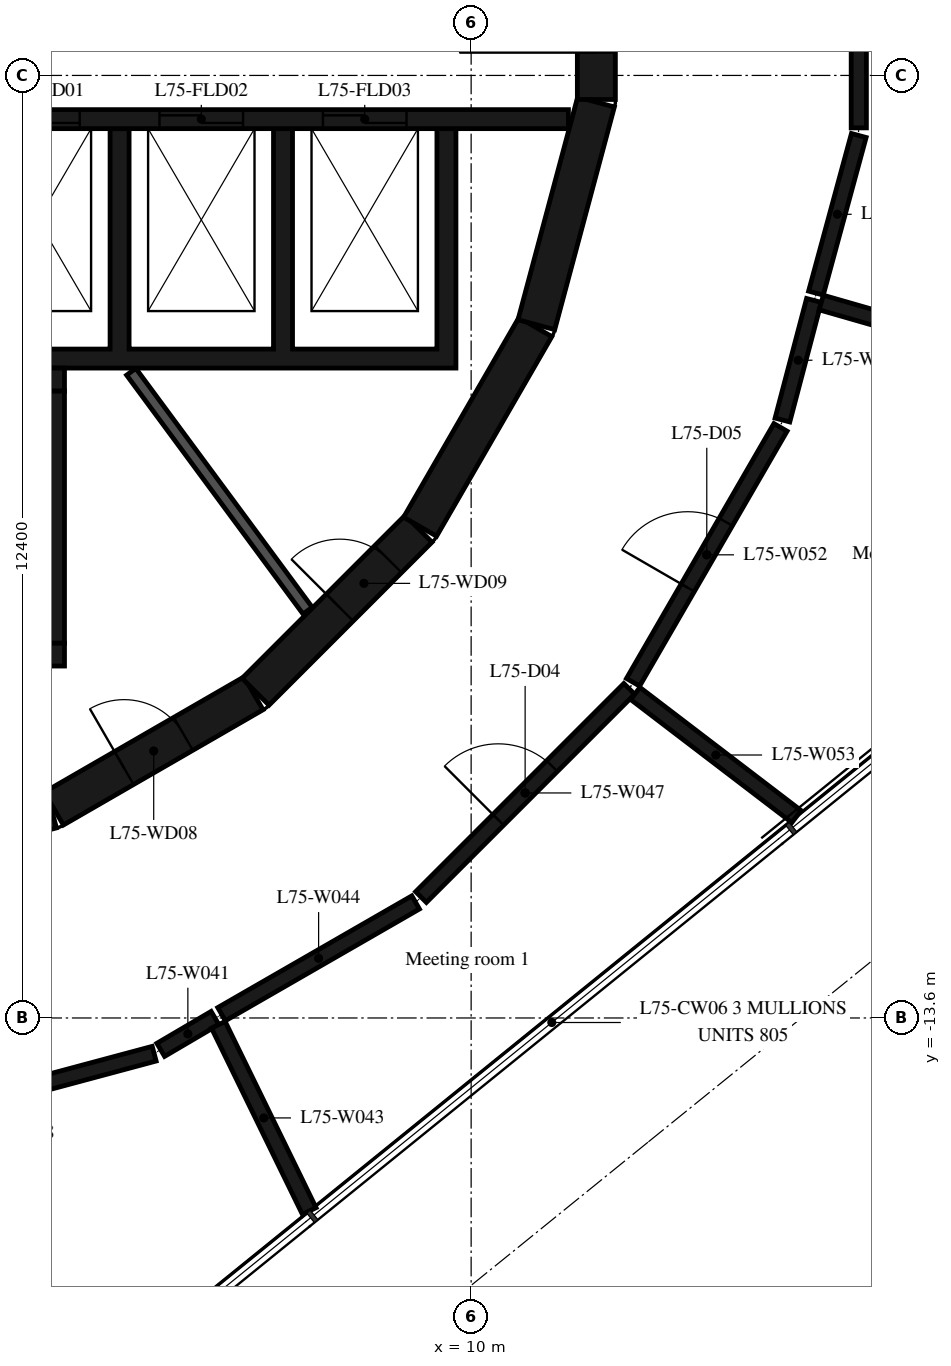
"""IFC4 building model, lengths in metres.
Left out: names, types, materials, properties, quantities, classifications, styles, units other than length and angle.
Written with IfcOpenShell. Run it as: python <this file> out.ifc"""

import sys

from ifc_helpers import new_model, si_unit, direction, frame, frame_2d, origin, place, context, subcontext, project, spatial, polyline, rectangle, outline, extrude, element, fill, save


model = new_model("IFC4")
c1 = context("Model", 3, precision=1e-05, world=origin(), true_north=direction((0.0, 1.0)))
c2 = subcontext(c1, "Body", "Model", "MODEL_VIEW")
j1 = project(units=[si_unit("LENGTHUNIT", "METRE"), si_unit("PLANEANGLEUNIT", "RADIAN")], contexts=[c1])
p1 = place(None, origin())
s1 = spatial("IfcSite", under=j1, at=p1, CompositionType="ELEMENT")
p2 = place(p1, origin())
s2 = spatial("IfcBuilding", under=s1, at=p2, CompositionType="ELEMENT")
p3 = place(p2, frame((0.0, 0.0, 291.4)))
s3 = spatial("IfcBuildingStorey", under=s2, at=p3, CompositionType="ELEMENT", Elevation=291.4)
p4 = place(p3, frame((1.55, -11.643, 0.0), z_axis=(0.0, 0.0, 1.0), x_axis=(0.965948410781, 0.258734743916, 0.0)))
e1 = element("IfcWall", 1, at=p4, inside=s3, PredefinedType="SHEAR", context=c2, shape_type="SweptSolid", body=[
    extrude(rectangle(XDim=3.033, YDim=0.5, at=frame_2d((1.516, 0.0))), origin(), (0.0, 0.0, 1.0), 6.35),
])
p5 = place(p3, frame((4.51, -10.845, 0.0), z_axis=(0.0, 0.0, 1.0), x_axis=(0.865975092491, 0.500087131594, 0.0)))
e2 = element("IfcWall", 2, at=p5, inside=s3, PredefinedType="SHEAR", context=c2, shape_type="SweptSolid", body=[
    extrude(rectangle(XDim=3.033, YDim=0.5, at=frame_2d((1.516, 0.0))), origin(), (0.0, 0.0, 1.0), 6.35),
])
p6 = place(p5, frame((1.066, 0.0, 0.0)))
e3 = element("IfcOpeningElement", 3, at=p6, cuts=e2, PredefinedType="OPENING", context=c2, shape_type="SweptSolid", body=[
    extrude(rectangle(XDim=0.9, YDim=2.1, at=frame_2d((0.45, 1.05))), frame((0.0, 0.26, 0.0), z_axis=(0.0, -1.0, 0.0), x_axis=(1.0, 0.0, 0.0)), (0.0, 0.0, 1.0), 0.52),
])
p7 = place(p3, frame((7.164, -9.308, 0.0), z_axis=(0.0, 0.0, 1.0), x_axis=(0.707106781187, 0.707106781187, 0.0)))
e4 = element("IfcWall", 4, at=p7, inside=s3, PredefinedType="SHEAR", context=c2, shape_type="SweptSolid", body=[
    extrude(rectangle(XDim=3.032, YDim=0.5, at=frame_2d((1.516, 0.0))), origin(), (0.0, 0.0, 1.0), 6.35),
])
p8 = place(p7, frame((1.566, 0.0, 0.0)))
e5 = element("IfcOpeningElement", 5, at=p8, cuts=e4, PredefinedType="OPENING", context=c2, shape_type="SweptSolid", body=[
    extrude(rectangle(XDim=0.9, YDim=2.1, at=frame_2d((0.45, 1.05))), frame((0.0, 0.26, 0.0), z_axis=(0.0, -1.0, 0.0), x_axis=(1.0, 0.0, 0.0)), (0.0, 0.0, 1.0), 0.52),
])
for number, where, z_axis, x_axis in (
    (6, (9.329, -7.137, 0.0), (0.0, 0.0, 1.0), (0.5, 0.866, 0.0)),
    (7, (10.858, -4.479, 0.0), (0.0, 0.0, 1.0), (0.259, 0.966, 0.0)),
):
    element("IfcWall", number, at=place(p3, frame(where, z_axis=z_axis, x_axis=x_axis)), inside=s3, PredefinedType="SHEAR", context=c2, shape_type="SweptSolid", body=[
        extrude(rectangle(XDim=3.033, YDim=0.5, at=frame_2d((1.516, 0.0))), origin(), (0.0, 0.0, 1.0), 6.35),
    ])
p9 = place(p3, frame((11.647, -1.516, 0.0), z_axis=(0.0, 0.0, 1.0), x_axis=(0.0, 1.0, 0.0)))
e8 = element("IfcWall", 8, at=p9, inside=s3, PredefinedType="SHEAR", context=c2, shape_type="SweptSolid", body=[
    extrude(rectangle(XDim=3.033, YDim=0.5, at=frame_2d((1.516, 0.0))), origin(), (0.0, 0.0, 1.0), 6.35),
])
p10 = place(p9, frame((0.616, 0.0, 0.0)))
e9 = element("IfcOpeningElement", 9, at=p10, cuts=e8, PredefinedType="OPENING", context=c2, shape_type="SweptSolid", body=[
    extrude(rectangle(XDim=1.8, YDim=2.1, at=frame_2d((0.9, 1.05))), frame((0.0, 0.26, 0.0), z_axis=(0.0, -1.0, 0.0), x_axis=(1.0, 0.0, 0.0)), (0.0, 0.0, 1.0), 0.52),
])
p11 = place(p3, frame((-2.4, -5.2, 0.0), z_axis=(0.0, 0.0, 1.0), x_axis=(1.0, 0.0, 0.0)))
e10 = element("IfcWall", 10, at=p11, inside=s3, PredefinedType="SHEAR", context=c2, shape_type="SweptSolid", body=[
    extrude(rectangle(XDim=7.05, YDim=0.3, at=frame_2d((3.525, 0.0))), origin(), (0.0, 0.0, 1.0), 6.35),
])
p12 = place(p3, frame((4.5, -8.67, 0.0), z_axis=(0.0, 0.0, 1.0), x_axis=(0.0, 1.0, 0.0)))
e11 = element("IfcWall", 11, at=p12, inside=s3, PredefinedType="SHEAR", context=c2, shape_type="SweptSolid", body=[
    extrude(rectangle(XDim=3.32, YDim=0.3, at=frame_2d((1.66, 0.0))), origin(), (0.0, 0.0, 1.0), 6.35),
])
p13 = place(p3, frame((0.1, -8.82, 0.0), z_axis=(0.0, 0.0, 1.0), x_axis=(1.0, 0.0, 0.0)))
e12 = element("IfcWall", 12, at=p13, inside=s3, PredefinedType="SHEAR", context=c2, shape_type="SweptSolid", body=[
    extrude(rectangle(XDim=4.55, YDim=0.3, at=frame_2d((2.275, 0.0))), origin(), (0.0, 0.0, 1.0), 6.35),
])
p14 = place(p3, origin())
e13 = element("IfcWall", 13, at=p14, inside=s3, PredefinedType="SHEAR", context=c2, shape_type="SweptSolid", body=[
    extrude(outline(polyline([(9.8, -5.05), (9.8, -4.8), (9.8, -1.9), (9.55, -1.9), (9.55, -4.8), (7.65, -4.8), (7.65, -1.9), (7.4, -1.9), (7.4, -4.8), (5.5, -4.8), (5.5, -1.9), (5.25, -1.9), (5.25, -4.8), (3.35, -4.8), (3.35, -1.9), (3.1, -1.9), (3.1, -4.8), (1.2, -4.8), (1.2, -1.9), (0.95, -1.9), (0.95, -4.8), (-0.95, -4.8), (-0.95, -1.9), (-1.2, -1.9), (-1.2, -4.8), (-3.1, -4.8), (-3.1, -1.9), (-3.35, -1.9), (-3.35, -4.8), (-5.25, -4.8), (-5.25, -1.9), (-5.5, -1.9), (-5.5, -4.8), (-9.55, -4.8), (-9.55, -1.9), (-9.8, -1.9), (-9.8, -4.8), (-9.8, -5.05), (9.8, -5.05)])), origin(), (0.0, 0.0, 1.0), 6.35),
])
p15 = place(p3, frame((3.35, -1.775, 0.0), z_axis=(0.0, 0.0, 1.0), x_axis=(1.0, 0.0, 0.0)))
e14 = element("IfcWall", 14, at=p15, inside=s3, PredefinedType="SHEAR", context=c2, shape_type="SweptSolid", body=[
    extrude(rectangle(XDim=7.93, YDim=0.25, at=frame_2d((3.965, 0.0))), origin(), (0.0, 0.0, 1.0), 6.35),
])
p16 = place(p15, frame((0.4, 0.0, 0.0)))
e15 = element("IfcOpeningElement", 15, at=p16, cuts=e14, PredefinedType="OPENING", context=c2, shape_type="SweptSolid", body=[
    extrude(rectangle(XDim=1.1, YDim=2.4, at=frame_2d((0.55, 1.2))), frame((0.0, 0.135, 0.0), z_axis=(0.0, -1.0, 0.0), x_axis=(1.0, 0.0, 0.0)), (0.0, 0.0, 1.0), 0.27),
])
p17 = place(p15, frame((2.55, 0.0, 0.0)))
e16 = element("IfcOpeningElement", 16, at=p17, cuts=e14, PredefinedType="OPENING", context=c2, shape_type="SweptSolid", body=[
    extrude(rectangle(XDim=1.1, YDim=2.4, at=frame_2d((0.55, 1.2))), frame((0.0, 0.135, 0.0), z_axis=(0.0, -1.0, 0.0), x_axis=(1.0, 0.0, 0.0)), (0.0, 0.0, 1.0), 0.27),
])
p18 = place(p15, frame((4.7, 0.0, 0.0)))
e17 = element("IfcOpeningElement", 17, at=p18, cuts=e14, PredefinedType="OPENING", context=c2, shape_type="SweptSolid", body=[
    extrude(rectangle(XDim=1.1, YDim=2.4, at=frame_2d((0.55, 1.2))), frame((0.0, 0.135, 0.0), z_axis=(0.0, -1.0, 0.0), x_axis=(1.0, 0.0, 0.0)), (0.0, 0.0, 1.0), 0.27),
])
p19 = place(p3, frame((5.528, -5.098, 0.0), z_axis=(0.0, 0.0, 1.0), x_axis=(0.594034318069, -0.804439698769, 0.0)))
e18 = element("IfcWall", 18, at=p19, inside=s3, PredefinedType="PARTITIONING", context=c2, shape_type="SweptSolid", body=[
    extrude(rectangle(XDim=3.907, YDim=0.15, at=frame_2d((1.953, 0.0))), origin(), (0.0, 0.0, 1.0), 6.35),
])
p20 = place(p3, frame((2.087, -15.074, 0.0), z_axis=(0.0, 0.0, 1.0), x_axis=(0.965870133458, 0.259026804199, 0.0)))
e19 = element("IfcWall", 19, at=p20, inside=s3, PredefinedType="PARTITIONING", context=c2, shape_type="SweptSolid", body=[
    extrude(rectangle(XDim=3.876, YDim=0.2, at=frame_2d((1.938, 0.0))), origin(), (0.0, 0.0, 1.0), 6.35),
])
p21 = place(p20, frame((1.438, 0.0, 0.0)))
e20 = element("IfcOpeningElement", 20, at=p21, cuts=e19, PredefinedType="OPENING", context=c2, shape_type="SweptSolid", body=[
    extrude(rectangle(XDim=1.0, YDim=2.1, at=frame_2d((0.5, 1.05))), frame((0.0, 0.11, 0.0), z_axis=(0.0, -1.0, 0.0), x_axis=(1.0, 0.0, 0.0)), (0.0, 0.0, 1.0), 0.22),
])
p22 = place(p3, frame((5.916, -14.019, 0.0), z_axis=(0.0, 0.0, 1.0), x_axis=(0.862244964115, 0.506491482513, 0.0)))
e21 = element("IfcWall", 21, at=p22, inside=s3, PredefinedType="PARTITIONING", context=c2, shape_type="SweptSolid", body=[
    extrude(rectangle(XDim=0.828, YDim=0.2, at=frame_2d((0.414, 0.0))), origin(), (0.0, 0.0, 1.0), 6.35),
])
p23 = place(p3, frame((6.674, -13.69, 0.0), z_axis=(0.0, 0.0, 1.0), x_axis=(0.438776447323, -0.898596254875, 0.0)))
e22 = element("IfcWall", 22, at=p23, inside=s3, PredefinedType="PARTITIONING", context=c2, shape_type="SweptSolid", body=[
    extrude(rectangle(XDim=2.726, YDim=0.2, at=frame_2d((1.363, 0.0))), origin(), (0.0, 0.0, 1.0), 6.35),
])
p24 = place(p3, frame((6.717, -13.55, 0.0), z_axis=(0.0, 0.0, 1.0), x_axis=(0.86665285702, 0.498911640894, 0.0)))
e23 = element("IfcWall", 23, at=p24, inside=s3, PredefinedType="PARTITIONING", context=c2, shape_type="SweptSolid", body=[
    extrude(rectangle(XDim=2.946, YDim=0.2, at=frame_2d((1.473, 0.0))), origin(), (0.0, 0.0, 1.0), 6.35),
])
p25 = place(p3, frame((9.341, -12.009, 0.0), z_axis=(0.0, 0.0, 1.0), x_axis=(0.707106781187, 0.707106781187, 0.0)))
e24 = element("IfcWall", 24, at=p25, inside=s3, PredefinedType="PARTITIONING", context=c2, shape_type="SweptSolid", body=[
    extrude(rectangle(XDim=3.874, YDim=0.2, at=frame_2d((1.937, 0.0))), origin(), (0.0, 0.0, 1.0), 6.35),
])
p26 = place(p25, frame((1.437, 0.0, 0.0)))
e25 = element("IfcOpeningElement", 25, at=p26, cuts=e24, PredefinedType="OPENING", context=c2, shape_type="SweptSolid", body=[
    extrude(rectangle(XDim=1.0, YDim=2.1, at=frame_2d((0.5, 1.05))), frame((0.0, 0.11, 0.0), z_axis=(0.0, -1.0, 0.0), x_axis=(1.0, 0.0, 0.0)), (0.0, 0.0, 1.0), 0.22),
])
p27 = place(p3, frame((12.13, -9.183, 0.0), z_axis=(0.0, 0.0, 1.0), x_axis=(0.500760497952, 0.865585884642, 0.0)))
e26 = element("IfcWall", 26, at=p27, inside=s3, PredefinedType="PARTITIONING", context=c2, shape_type="SweptSolid", body=[
    extrude(rectangle(XDim=3.874, YDim=0.2, at=frame_2d((1.937, 0.0))), origin(), (0.0, 0.0, 1.0), 6.35),
])
p28 = place(p27, frame((1.437, 0.0, 0.0)))
e27 = element("IfcOpeningElement", 27, at=p28, cuts=e26, PredefinedType="OPENING", context=c2, shape_type="SweptSolid", body=[
    extrude(rectangle(XDim=1.0, YDim=2.1, at=frame_2d((0.5, 1.05))), frame((0.0, 0.11, 0.0), z_axis=(0.0, -1.0, 0.0), x_axis=(1.0, 0.0, 0.0)), (0.0, 0.0, 1.0), 0.22),
])
p29 = place(p3, frame((12.159, -9.331, 0.0), z_axis=(0.0, 0.0, 1.0), x_axis=(0.794809542304, -0.606858955164, 0.0)))
e28 = element("IfcWall", 28, at=p29, inside=s3, PredefinedType="PARTITIONING", context=c2, shape_type="SweptSolid", body=[
    extrude(rectangle(XDim=2.668, YDim=0.2, at=frame_2d((1.334, 0.0))), origin(), (0.0, 0.0, 1.0), 6.35),
])
p30 = place(p3, frame((14.095, -5.733, 0.0), z_axis=(0.0, 0.0, 1.0), x_axis=(0.254766547026, 0.967002588681, 0.0)))
e29 = element("IfcWall", 29, at=p30, inside=s3, PredefinedType="PARTITIONING", context=c2, shape_type="SweptSolid", body=[
    extrude(rectangle(XDim=1.627, YDim=0.2, at=frame_2d((0.813, 0.0))), origin(), (0.0, 0.0, 1.0), 6.35),
])
p31 = place(p3, frame((14.536, -4.063, 0.0), z_axis=(0.0, 0.0, 1.0), x_axis=(0.262453998326, 0.964944505535, 0.0)))
e30 = element("IfcWall", 30, at=p31, inside=s3, PredefinedType="PARTITIONING", context=c2, shape_type="SweptSolid", body=[
    extrude(rectangle(XDim=2.149, YDim=0.2, at=frame_2d((1.074, 0.0))), origin(), (0.0, 0.0, 1.0), 6.35),
])
p32 = place(p3, frame((14.606, -4.188, 0.0), z_axis=(0.0, 0.0, 1.0), x_axis=(0.961099801691, -0.276201323656, 0.0)))
e31 = element("IfcWall", 31, at=p32, inside=s3, PredefinedType="PARTITIONING", context=c2, shape_type="SweptSolid", body=[
    extrude(rectangle(XDim=6.164, YDim=0.2, at=frame_2d((3.082, 0.0))), origin(), (0.0, 0.0, 1.0), 6.35),
])
p33 = place(p3, frame((15.1, -1.89, 0.0), z_axis=(0.0, 0.0, 1.0), x_axis=(0.0, 1.0, 0.0)))
e32 = element("IfcWall", 32, at=p33, inside=s3, PredefinedType="PARTITIONING", context=c2, shape_type="SweptSolid", body=[
    extrude(rectangle(XDim=3.77, YDim=0.2, at=frame_2d((1.885, 0.0))), origin(), (0.0, 0.0, 1.0), 6.35),
])
p34 = place(p33, frame((1.385, 0.0, 0.0)))
e33 = element("IfcOpeningElement", 33, at=p34, cuts=e32, PredefinedType="OPENING", context=c2, shape_type="SweptSolid", body=[
    extrude(rectangle(XDim=1.0, YDim=2.1, at=frame_2d((0.5, 1.05))), frame((0.0, 0.11, 0.0), z_axis=(0.0, -1.0, 0.0), x_axis=(1.0, 0.0, 0.0)), (0.0, 0.0, 1.0), 0.22),
])
p35 = place(p10, origin())
e34 = element("IfcDoor", 34, at=p35, inside=s3, OperationType="DOUBLE_DOOR_SINGLE_SWING", PredefinedType="DOOR", context=c2, shape_type="SweptSolid", body=[
    extrude(rectangle(XDim=1.8, YDim=2.1, at=frame_2d((0.9, 1.05))), frame((0.0, 0.025, 0.0), z_axis=(0.0, -1.0, 0.0), x_axis=(1.0, 0.0, 0.0)), (0.0, 0.0, 1.0), 0.05),
])
fill(e9, e34)
p36 = place(p16, origin())
e35 = element("IfcDoor", 35, at=p36, inside=s3, OperationType="DOUBLE_DOOR_SLIDING", PredefinedType="DOOR", context=c2, shape_type="SweptSolid", body=[
    extrude(rectangle(XDim=1.1, YDim=2.4, at=frame_2d((0.55, 1.2))), frame((0.0, 0.025, 0.0), z_axis=(0.0, -1.0, 0.0), x_axis=(1.0, 0.0, 0.0)), (0.0, 0.0, 1.0), 0.05),
])
fill(e15, e35)
p37 = place(p17, origin())
e36 = element("IfcDoor", 36, at=p37, inside=s3, OperationType="DOUBLE_DOOR_SLIDING", PredefinedType="DOOR", context=c2, shape_type="SweptSolid", body=[
    extrude(rectangle(XDim=1.1, YDim=2.4, at=frame_2d((0.55, 1.2))), frame((0.0, 0.025, 0.0), z_axis=(0.0, -1.0, 0.0), x_axis=(1.0, 0.0, 0.0)), (0.0, 0.0, 1.0), 0.05),
])
fill(e16, e36)
p38 = place(p18, origin())
e37 = element("IfcDoor", 37, at=p38, inside=s3, OperationType="DOUBLE_DOOR_SLIDING", PredefinedType="DOOR", context=c2, shape_type="SweptSolid", body=[
    extrude(rectangle(XDim=1.1, YDim=2.4, at=frame_2d((0.55, 1.2))), frame((0.0, 0.025, 0.0), z_axis=(0.0, -1.0, 0.0), x_axis=(1.0, 0.0, 0.0)), (0.0, 0.0, 1.0), 0.05),
])
fill(e17, e37)
p39 = place(p6, origin())
e38 = element("IfcDoor", 38, at=p39, inside=s3, OperationType="SINGLE_SWING_RIGHT", PredefinedType="DOOR", context=c2, shape_type="SweptSolid", body=[
    extrude(rectangle(XDim=0.9, YDim=2.1, at=frame_2d((0.45, 1.05))), frame((0.0, 0.025, 0.0), z_axis=(0.0, -1.0, 0.0), x_axis=(1.0, 0.0, 0.0)), (0.0, 0.0, 1.0), 0.05),
])
fill(e3, e38)
p40 = place(p8, origin())
e39 = element("IfcDoor", 39, at=p40, inside=s3, OperationType="SINGLE_SWING_LEFT", PredefinedType="DOOR", context=c2, shape_type="SweptSolid", body=[
    extrude(rectangle(XDim=0.9, YDim=2.1, at=frame_2d((0.45, 1.05))), frame((0.0, 0.025, 0.0), z_axis=(0.0, -1.0, 0.0), x_axis=(1.0, 0.0, 0.0)), (0.0, 0.0, 1.0), 0.05),
])
fill(e5, e39)
p41 = place(p26, origin())
e40 = element("IfcDoor", 40, at=p41, inside=s3, OperationType="SINGLE_SWING_LEFT", PredefinedType="DOOR", context=c2, shape_type="SweptSolid", body=[
    extrude(rectangle(XDim=1.0, YDim=2.1, at=frame_2d((0.5, 1.05))), frame((0.0, 0.025, 0.0), z_axis=(0.0, -1.0, 0.0), x_axis=(1.0, 0.0, 0.0)), (0.0, 0.0, 1.0), 0.05),
])
fill(e25, e40)
p42 = place(p28, origin())
e41 = element("IfcDoor", 41, at=p42, inside=s3, OperationType="SINGLE_SWING_LEFT", PredefinedType="DOOR", context=c2, shape_type="SweptSolid", body=[
    extrude(rectangle(XDim=1.0, YDim=2.1, at=frame_2d((0.5, 1.05))), frame((0.0, 0.025, 0.0), z_axis=(0.0, -1.0, 0.0), x_axis=(1.0, 0.0, 0.0)), (0.0, 0.0, 1.0), 0.05),
])
fill(e27, e41)
save(model, sys.argv[1])
